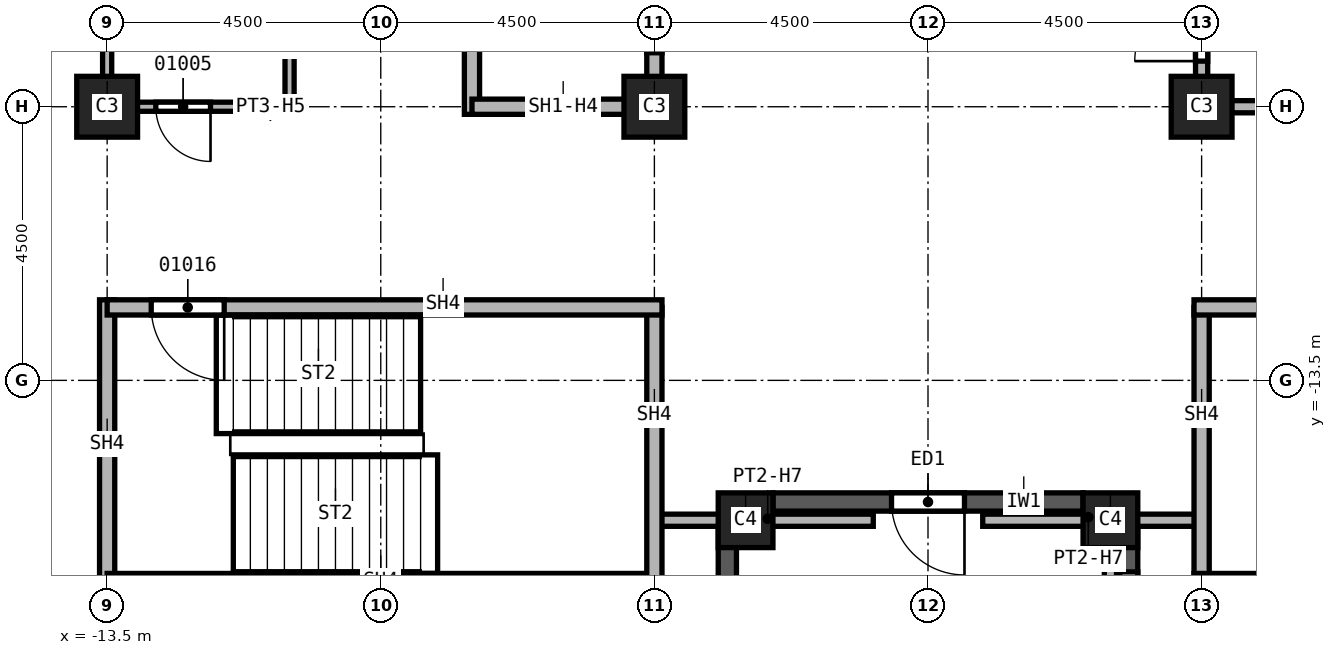
"""IFC4 building model, lengths in metres.
Left out: names, types, materials, properties, quantities, classifications, styles, units other than length and angle.
Written with IfcOpenShell. Run it as: python <this file> out.ifc"""

import sys

from ifc_helpers import new_model, si_unit, direction, frame, frame_2d, origin, origin_2d, place, context, subcontext, project, spatial, rectangle, extrude, element, fill, save


model = new_model("IFC4")
c1 = context("Model", 3, precision=1e-05, world=origin(), true_north=direction((0.0, 1.0)))
c2 = subcontext(c1, "Body", "Model", "MODEL_VIEW")
j1 = project(units=[si_unit("LENGTHUNIT", "METRE"), si_unit("PLANEANGLEUNIT", "RADIAN")], contexts=[c1])
p1 = place(None, origin())
s1 = spatial("IfcSite", under=j1, at=p1, CompositionType="ELEMENT")
p2 = place(p1, origin())
s2 = spatial("IfcBuilding", under=s1, at=p2, CompositionType="ELEMENT")
p3 = place(p2, frame((0.0, 0.0, 68.0)))
s3 = spatial("IfcBuildingStorey", under=s2, at=p3, CompositionType="ELEMENT", Elevation=68.0)
for number, where, z_axis, x_axis in (
    (1, (4.5, -9.0, 0.0), (0.0, 0.0, 1.0), (1.0, 0.0, 0.0)),
    (2, (-4.5, -9.0, 0.0), (0.0, 0.0, 1.0), (1.0, 0.0, 0.0)),
    (3, (-13.5, -9.0, 0.0), (0.0, 0.0, 1.0), (1.0, 0.0, 0.0)),
):
    element("IfcColumn", number, at=place(p3, frame(where, z_axis=z_axis, x_axis=x_axis)), inside=s3, PredefinedType="COLUMN", context=c2, shape_type="SweptSolid", body=[
        extrude(rectangle(XDim=1.0, YDim=1.0, at=origin_2d()), origin(), (0.0, 0.0, 1.0), 3.7),
    ])
for number, where, z_axis, x_axis in (
    (4, (3.0, -15.8, 0.0), (0.0, 0.0, 1.0), (1.0, 0.0, 0.0)),
    (5, (-3.0, -15.8, 0.0), (0.0, 0.0, 1.0), (1.0, 0.0, 0.0)),
):
    element("IfcColumn", number, at=place(p3, frame(where, z_axis=z_axis, x_axis=x_axis)), inside=s3, PredefinedType="COLUMN", context=c2, shape_type="SweptSolid", body=[
        extrude(rectangle(XDim=0.9, YDim=0.9, at=origin_2d()), origin(), (0.0, 0.0, 1.0), 3.7),
    ])
p4 = place(p3, frame((-3.3, -24.2, 0.0), z_axis=(0.0, 0.0, 1.0), x_axis=(0.0, 1.0, 0.0)))
e6 = element("IfcWall", 6, at=p4, inside=s3, PredefinedType="SOLIDWALL", context=c2, shape_type="SweptSolid", body=[
    extrude(rectangle(XDim=8.35, YDim=0.3, at=frame_2d((4.175, 0.0))), origin(), (0.0, 0.0, 1.0), 3.1),
])
p5 = place(p4, frame((0.788, 0.0, 0.8)))
e7 = element("IfcOpeningElement", 7, at=p5, cuts=e6, PredefinedType="OPENING", context=c2, shape_type="SweptSolid", body=[
    extrude(rectangle(XDim=2.4, YDim=1.95, at=frame_2d((1.2, 0.975))), frame((0.0, 0.15, 0.0), z_axis=(0.0, -1.0, 0.0), x_axis=(1.0, 0.0, 0.0)), (0.0, 0.0, 1.0), 0.3),
])
p6 = place(p4, frame((4.762, 0.0, 0.8)))
e8 = element("IfcOpeningElement", 8, at=p6, cuts=e6, PredefinedType="OPENING", context=c2, shape_type="SweptSolid", body=[
    extrude(rectangle(XDim=2.4, YDim=1.95, at=frame_2d((1.2, 0.975))), frame((0.0, 0.15, 0.0), z_axis=(0.0, -1.0, 0.0), x_axis=(1.0, 0.0, 0.0)), (0.0, 0.0, 1.0), 0.3),
])
p7 = place(p3, frame((2.55, -15.5, 0.0), z_axis=(0.0, 0.0, 1.0), x_axis=(-1.0, 0.0, 0.0)))
e9 = element("IfcWall", 9, at=p7, inside=s3, PredefinedType="SOLIDWALL", context=c2, shape_type="SweptSolid", body=[
    extrude(rectangle(XDim=5.1, YDim=0.3, at=frame_2d((2.55, 0.0))), origin(), (0.0, 0.0, 1.0), 3.1),
])
p8 = place(p7, frame((1.95, 0.0, 0.0)))
e10 = element("IfcOpeningElement", 10, at=p8, cuts=e9, PredefinedType="OPENING", context=c2, shape_type="SweptSolid", body=[
    extrude(rectangle(XDim=1.2, YDim=2.4, at=frame_2d((0.6, 1.2))), frame((0.0, 0.15, 0.0), z_axis=(0.0, -1.0, 0.0), x_axis=(1.0, 0.0, 0.0)), (0.0, 0.0, 1.0), 0.3),
])
p9 = place(p3, frame((3.3, -15.85, 0.0), z_axis=(0.0, 0.0, 1.0), x_axis=(0.0, -1.0, 0.0)))
e11 = element("IfcWall", 11, at=p9, inside=s3, PredefinedType="SOLIDWALL", context=c2, shape_type="SweptSolid", body=[
    extrude(rectangle(XDim=8.35, YDim=0.3, at=frame_2d((4.175, 0.0))), origin(), (0.0, 0.0, 1.0), 3.1),
])
p10 = place(p9, frame((4.363, 0.0, 0.8)))
e12 = element("IfcOpeningElement", 12, at=p10, cuts=e11, PredefinedType="OPENING", context=c2, shape_type="SweptSolid", body=[
    extrude(rectangle(XDim=2.4, YDim=1.95, at=frame_2d((1.2, 0.975))), frame((0.0, 0.15, 0.0), z_axis=(0.0, -1.0, 0.0), x_axis=(1.0, 0.0, 0.0)), (0.0, 0.0, 1.0), 0.3),
])
p11 = place(p9, frame((0.8, 0.0, 0.8)))
e13 = element("IfcOpeningElement", 13, at=p11, cuts=e11, PredefinedType="OPENING", context=c2, shape_type="SweptSolid", body=[
    extrude(rectangle(XDim=1.8, YDim=1.95, at=frame_2d((0.9, 0.975))), frame((0.0, 0.15, 0.0), z_axis=(0.0, -1.0, 0.0), x_axis=(1.0, 0.0, 0.0)), (0.0, 0.0, 1.0), 0.3),
])
p12 = place(p3, frame((-13.5, -16.675, 0.0), z_axis=(0.0, 0.0, 1.0), x_axis=(0.0, -1.0, 0.0)))
e14 = element("IfcWall", 14, at=p12, inside=s3, PredefinedType="PARTITIONING", context=c2, shape_type="SweptSolid", body=[
    extrude(rectangle(XDim=7.525, YDim=0.2, at=frame_2d((3.762, 0.0))), origin(), (0.0, 0.0, 1.0), 3.7),
])
p13 = place(p12, frame((2.2, 0.0, 0.0)))
e15 = element("IfcOpeningElement", 15, at=p13, cuts=e14, PredefinedType="OPENING", context=c2, shape_type="SweptSolid", body=[
    extrude(rectangle(XDim=1.0, YDim=2.1, at=frame_2d((0.5, 1.05))), frame((0.0, 0.1, 0.0), z_axis=(0.0, -1.0, 0.0), x_axis=(1.0, 0.0, 0.0)), (0.0, 0.0, 1.0), 0.2),
])
p14 = place(p3, frame((-0.9, -15.8, 0.0), z_axis=(0.0, 0.0, 1.0), x_axis=(-1.0, 0.0, 0.0)))
e16 = element("IfcWall", 16, at=p14, inside=s3, PredefinedType="PARTITIONING", context=c2, shape_type="SweptSolid", body=[
    extrude(rectangle(XDim=3.6, YDim=0.2, at=frame_2d((1.8, 0.0))), origin(), (0.0, 0.0, 1.0), 3.083),
])
p15 = place(p3, frame((3.0, -15.8, 0.0), z_axis=(0.0, 0.0, 1.0), x_axis=(0.0, -1.0, 0.0)))
e17 = element("IfcWall", 17, at=p15, inside=s3, PredefinedType="PARTITIONING", context=c2, shape_type="SweptSolid", body=[
    extrude(rectangle(XDim=8.4, YDim=0.2, at=frame_2d((4.2, 0.0))), origin(), (0.0, 0.0, 1.0), 2.854),
])
p16 = place(p3, frame((4.5, -15.8, 0.0), z_axis=(0.0, 0.0, 1.0), x_axis=(-1.0, 0.0, 0.0)))
e18 = element("IfcWall", 18, at=p16, inside=s3, PredefinedType="PARTITIONING", context=c2, shape_type="SweptSolid", body=[
    extrude(rectangle(XDim=3.6, YDim=0.2, at=frame_2d((1.8, 0.0))), origin(), (0.0, 0.0, 1.0), 3.083),
])
p17 = place(p3, frame((4.5, -9.1, 0.0), z_axis=(0.0, 0.0, 1.0), x_axis=(0.0, 1.0, 0.0)))
e19 = element("IfcWall", 19, at=p17, inside=s3, PredefinedType="SOLIDWALL", context=c2, shape_type="SweptSolid", body=[
    extrude(rectangle(XDim=9.1, YDim=0.2, at=frame_2d((4.55, 0.0))), origin(), (0.0, 0.0, 1.0), 2.938),
])
p18 = place(p17, frame((0.85, 0.0, 0.0)))
e20 = element("IfcOpeningElement", 20, at=p18, cuts=e19, PredefinedType="OPENING", context=c2, shape_type="SweptSolid", body=[
    extrude(rectangle(XDim=1.1, YDim=2.1, at=frame_2d((0.55, 1.05))), frame((0.0, 0.1, 0.0), z_axis=(0.0, -1.0, 0.0), x_axis=(1.0, 0.0, 0.0)), (0.0, 0.0, 1.0), 0.2),
])
p19 = place(p17, frame((7.25, 0.0, 0.0)))
e21 = element("IfcOpeningElement", 21, at=p19, cuts=e19, PredefinedType="OPENING", context=c2, shape_type="SweptSolid", body=[
    extrude(rectangle(XDim=1.1, YDim=2.1, at=frame_2d((0.55, 1.05))), frame((0.0, 0.1, 0.0), z_axis=(0.0, -1.0, 0.0), x_axis=(1.0, 0.0, 0.0)), (0.0, 0.0, 1.0), 0.2),
])
p20 = place(p3, frame((7.5, -9.0, 0.0), z_axis=(0.0, 0.0, 1.0), x_axis=(-1.0, 0.0, 0.0)))
e22 = element("IfcWall", 22, at=p20, inside=s3, PredefinedType="SOLIDWALL", context=c2, shape_type="SweptSolid", body=[
    extrude(rectangle(XDim=3.0, YDim=0.2, at=frame_2d((1.5, 0.0))), origin(), (0.0, 0.0, 1.0), 2.938),
])
p21 = place(p3, frame((-7.5, -9.125, 0.0), z_axis=(0.0, 0.0, 1.0), x_axis=(0.0, 1.0, 0.0)))
e23 = element("IfcWall", 23, at=p21, inside=s3, PredefinedType="SOLIDWALL", context=c2, shape_type="SweptSolid", body=[
    extrude(rectangle(XDim=12.25, YDim=0.25, at=frame_2d((6.125, 0.0))), origin(), (0.0, 0.0, 1.0), 3.7),
])
p22 = place(p3, frame((-4.5, -9.0, 0.0), z_axis=(0.0, 0.0, 1.0), x_axis=(-1.0, 0.0, 0.0)))
e24 = element("IfcWall", 24, at=p22, inside=s3, PredefinedType="SOLIDWALL", context=c2, shape_type="SweptSolid", body=[
    extrude(rectangle(XDim=3.0, YDim=0.25, at=frame_2d((1.5, 0.0))), origin(), (0.0, 0.0, 1.0), 2.938),
])
p23 = place(p3, frame((-4.5, 0.0, 0.0), z_axis=(0.0, 0.0, 1.0), x_axis=(0.0, -1.0, 0.0)))
e25 = element("IfcWall", 25, at=p23, inside=s3, PredefinedType="SOLIDWALL", context=c2, shape_type="SweptSolid", body=[
    extrude(rectangle(XDim=9.125, YDim=0.25, at=frame_2d((4.562, 0.0))), origin(), (0.0, 0.0, 1.0), 2.938),
])
p24 = place(p23, frame((7.012, 0.0, 0.0)))
e26 = element("IfcOpeningElement", 26, at=p24, cuts=e25, PredefinedType="OPENING", context=c2, shape_type="SweptSolid", body=[
    extrude(rectangle(XDim=1.1, YDim=2.1, at=frame_2d((0.55, 1.05))), frame((0.0, 0.125, 0.0), z_axis=(0.0, -1.0, 0.0), x_axis=(1.0, 0.0, 0.0)), (0.0, 0.0, 1.0), 0.25),
])
p25 = place(p23, frame((3.95, 0.0, 0.0)))
e27 = element("IfcOpeningElement", 27, at=p25, cuts=e25, PredefinedType="OPENING", context=c2, shape_type="SweptSolid", body=[
    extrude(rectangle(XDim=1.1, YDim=2.1, at=frame_2d((0.55, 1.05))), frame((0.0, 0.125, 0.0), z_axis=(0.0, -1.0, 0.0), x_axis=(1.0, 0.0, 0.0)), (0.0, 0.0, 1.0), 0.25),
])
p26 = place(p23, frame((0.95, 0.0, 0.0)))
e28 = element("IfcOpeningElement", 28, at=p26, cuts=e25, PredefinedType="OPENING", context=c2, shape_type="SweptSolid", body=[
    extrude(rectangle(XDim=1.1, YDim=2.1, at=frame_2d((0.55, 1.05))), frame((0.0, 0.125, 0.0), z_axis=(0.0, -1.0, 0.0), x_axis=(1.0, 0.0, 0.0)), (0.0, 0.0, 1.0), 0.25),
])
p27 = place(p3, frame((-13.5, -12.175, 0.0), z_axis=(0.0, 0.0, 1.0), x_axis=(0.0, -1.0, 0.0)))
e29 = element("IfcWall", 29, at=p27, inside=s3, PredefinedType="SOLIDWALL", context=c2, shape_type="SweptSolid", body=[
    extrude(rectangle(XDim=4.75, YDim=0.25, at=frame_2d((2.375, 0.0))), origin(), (0.0, 0.0, 1.0), 3.7),
])
p28 = place(p3, frame((-4.5, -16.8, 0.0), z_axis=(0.0, 0.0, 1.0), x_axis=(-1.0, 0.0, 0.0)))
e30 = element("IfcWall", 30, at=p28, inside=s3, PredefinedType="SOLIDWALL", context=c2, shape_type="SweptSolid", body=[
    extrude(rectangle(XDim=9.0, YDim=0.25, at=frame_2d((4.5, 0.0))), origin(), (0.0, 0.0, 1.0), 3.7),
])
p29 = place(p3, frame((-4.5, -12.3, 0.0), z_axis=(0.0, 0.0, 1.0), x_axis=(0.0, -1.0, 0.0)))
e31 = element("IfcWall", 31, at=p29, inside=s3, PredefinedType="SOLIDWALL", context=c2, shape_type="SweptSolid", body=[
    extrude(rectangle(XDim=4.625, YDim=0.25, at=frame_2d((2.312, 0.0))), origin(), (0.0, 0.0, 1.0), 3.7),
])
p30 = place(p3, frame((-4.375, -12.3, 0.0), z_axis=(0.0, 0.0, 1.0), x_axis=(-1.0, 0.0, 0.0)))
e32 = element("IfcWall", 32, at=p30, inside=s3, PredefinedType="SOLIDWALL", context=c2, shape_type="SweptSolid", body=[
    extrude(rectangle(XDim=9.125, YDim=0.25, at=frame_2d((4.562, 0.0))), origin(), (0.0, 0.0, 1.0), 3.7),
])
p31 = place(p30, frame((7.2, 0.0, 0.0)))
e33 = element("IfcOpeningElement", 33, at=p31, cuts=e32, PredefinedType="OPENING", context=c2, shape_type="SweptSolid", body=[
    extrude(rectangle(XDim=1.2, YDim=2.1, at=frame_2d((0.6, 1.05))), frame((0.0, 0.125, 0.0), z_axis=(0.0, -1.0, 0.0), x_axis=(1.0, 0.0, 0.0)), (0.0, 0.0, 1.0), 0.25),
])
p32 = place(p3, frame((4.5, -16.8, 0.0), z_axis=(0.0, 0.0, 1.0), x_axis=(0.0, 1.0, 0.0)))
e34 = element("IfcWall", 34, at=p32, inside=s3, PredefinedType="SOLIDWALL", context=c2, shape_type="SweptSolid", body=[
    extrude(rectangle(XDim=4.5, YDim=0.25, at=frame_2d((2.25, 0.0))), origin(), (0.0, 0.0, 1.0), 3.7),
])
p33 = place(p3, frame((13.5, -16.8, 0.0), z_axis=(0.0, 0.0, 1.0), x_axis=(-1.0, 0.0, 0.0)))
e35 = element("IfcWall", 35, at=p33, inside=s3, PredefinedType="SOLIDWALL", context=c2, shape_type="SweptSolid", body=[
    extrude(rectangle(XDim=9.125, YDim=0.25, at=frame_2d((4.562, 0.0))), origin(), (0.0, 0.0, 1.0), 3.7),
])
p34 = place(p3, frame((13.5, -12.3, 0.0), z_axis=(0.0, 0.0, 1.0), x_axis=(-1.0, 0.0, 0.0)))
e36 = element("IfcWall", 36, at=p34, inside=s3, PredefinedType="SOLIDWALL", context=c2, shape_type="SweptSolid", body=[
    extrude(rectangle(XDim=9.125, YDim=0.25, at=frame_2d((4.562, 0.0))), origin(), (0.0, 0.0, 1.0), 3.7),
])
p35 = place(p34, frame((0.6, 0.0, 0.0)))
e37 = element("IfcOpeningElement", 37, at=p35, cuts=e36, PredefinedType="OPENING", context=c2, shape_type="SweptSolid", body=[
    extrude(rectangle(XDim=1.2, YDim=2.1, at=frame_2d((0.6, 1.05))), frame((0.0, 0.125, 0.0), z_axis=(0.0, -1.0, 0.0), x_axis=(1.0, 0.0, 0.0)), (0.0, 0.0, 1.0), 0.25),
])
p36 = place(p3, frame((-13.5, -9.075, 0.0), z_axis=(0.0, 0.0, 1.0), x_axis=(0.0, 1.0, 0.0)))
e38 = element("IfcWall", 38, at=p36, inside=s3, PredefinedType="PARTITIONING", context=c2, shape_type="SweptSolid", body=[
    extrude(rectangle(XDim=2.075, YDim=0.15, at=frame_2d((1.038, 0.0))), origin(), (0.0, 0.0, 1.0), 2.938),
])
p37 = place(p3, frame((-10.5, -9.075, 0.0), z_axis=(0.0, 0.0, 1.0), x_axis=(0.0, 1.0, 0.0)))
e39 = element("IfcWall", 39, at=p37, inside=s3, PredefinedType="PARTITIONING", context=c2, shape_type="SweptSolid", body=[
    extrude(rectangle(XDim=2.15, YDim=0.15, at=frame_2d((1.075, 0.0))), origin(), (0.0, 0.0, 1.0), 3.7),
])
p38 = place(p3, frame((-10.5, -9.0, 0.0), z_axis=(0.0, 0.0, 1.0), x_axis=(-1.0, 0.0, 0.0)))
e40 = element("IfcWall", 40, at=p38, inside=s3, PredefinedType="PARTITIONING", context=c2, shape_type="SweptSolid", body=[
    extrude(rectangle(XDim=3.0, YDim=0.15, at=frame_2d((1.5, 0.0))), origin(), (0.0, 0.0, 1.0), 2.938),
])
p39 = place(p38, frame((1.3, 0.0, 0.0)))
e41 = element("IfcOpeningElement", 41, at=p39, cuts=e40, PredefinedType="OPENING", context=c2, shape_type="SweptSolid", body=[
    extrude(rectangle(XDim=0.9, YDim=2.1, at=frame_2d((0.45, 1.05))), frame((0.0, 0.075, 0.0), z_axis=(0.0, -1.0, 0.0), x_axis=(1.0, 0.0, 0.0)), (0.0, 0.0, 1.0), 0.15),
])
p40 = place(p8, origin())
e42 = element("IfcDoor", 42, at=p40, inside=s3, OperationType="SINGLE_SWING_LEFT", PredefinedType="DOOR", context=c2, shape_type="SweptSolid", body=[
    extrude(rectangle(XDim=1.2, YDim=2.4, at=frame_2d((0.6, 1.2))), frame((0.0, 0.025, 0.0), z_axis=(0.0, -1.0, 0.0), x_axis=(1.0, 0.0, 0.0)), (0.0, 0.0, 1.0), 0.05),
])
fill(e10, e42)
p41 = place(p39, origin())
e43 = element("IfcDoor", 43, at=p41, inside=s3, OperationType="SINGLE_SWING_RIGHT", PredefinedType="DOOR", context=c2, shape_type="SweptSolid", body=[
    extrude(rectangle(XDim=0.9, YDim=2.1, at=frame_2d((0.45, 1.05))), frame((0.0, 0.025, 0.0), z_axis=(0.0, -1.0, 0.0), x_axis=(1.0, 0.0, 0.0)), (0.0, 0.0, 1.0), 0.05),
])
fill(e41, e43)
p42 = place(p18, origin())
e44 = element("IfcDoor", 44, at=p42, inside=s3, OperationType="SINGLE_SWING_LEFT", PredefinedType="DOOR", context=c2, shape_type="SweptSolid", body=[
    extrude(rectangle(XDim=1.1, YDim=2.1, at=frame_2d((0.55, 1.05))), frame((0.0, 0.025, 0.0), z_axis=(0.0, -1.0, 0.0), x_axis=(1.0, 0.0, 0.0)), (0.0, 0.0, 1.0), 0.05),
])
fill(e20, e44)
p43 = place(p31, origin())
e45 = element("IfcDoor", 45, at=p43, inside=s3, OperationType="SINGLE_SWING_LEFT", PredefinedType="DOOR", context=c2, shape_type="SweptSolid", body=[
    extrude(rectangle(XDim=1.2, YDim=2.1, at=frame_2d((0.6, 1.05))), frame((0.0, 0.025, 0.0), z_axis=(0.0, -1.0, 0.0), x_axis=(1.0, 0.0, 0.0)), (0.0, 0.0, 1.0), 0.05),
])
fill(e33, e45)
p44 = place(p24, origin())
e46 = element("IfcDoor", 46, at=p44, inside=s3, OperationType="SLIDING_TO_LEFT", PredefinedType="DOOR", context=c2, shape_type="SweptSolid", body=[
    extrude(rectangle(XDim=1.1, YDim=2.1, at=frame_2d((0.55, 1.05))), frame((0.0, 0.025, 0.0), z_axis=(0.0, -1.0, 0.0), x_axis=(1.0, 0.0, 0.0)), (0.0, 0.0, 1.0), 0.05),
])
fill(e26, e46)
p45 = place(p11, origin())
e47 = element("IfcWindow", 47, at=p45, inside=s3, PartitioningType="SINGLE_PANEL", PredefinedType="WINDOW", context=c2, shape_type="SweptSolid", body=[
    extrude(rectangle(XDim=1.8, YDim=1.95, at=frame_2d((0.9, 0.975))), frame((0.0, 0.03, 0.0), z_axis=(0.0, -1.0, 0.0), x_axis=(1.0, 0.0, 0.0)), (0.0, 0.0, 1.0), 0.06),
])
fill(e13, e47)
save(model, sys.argv[1])
